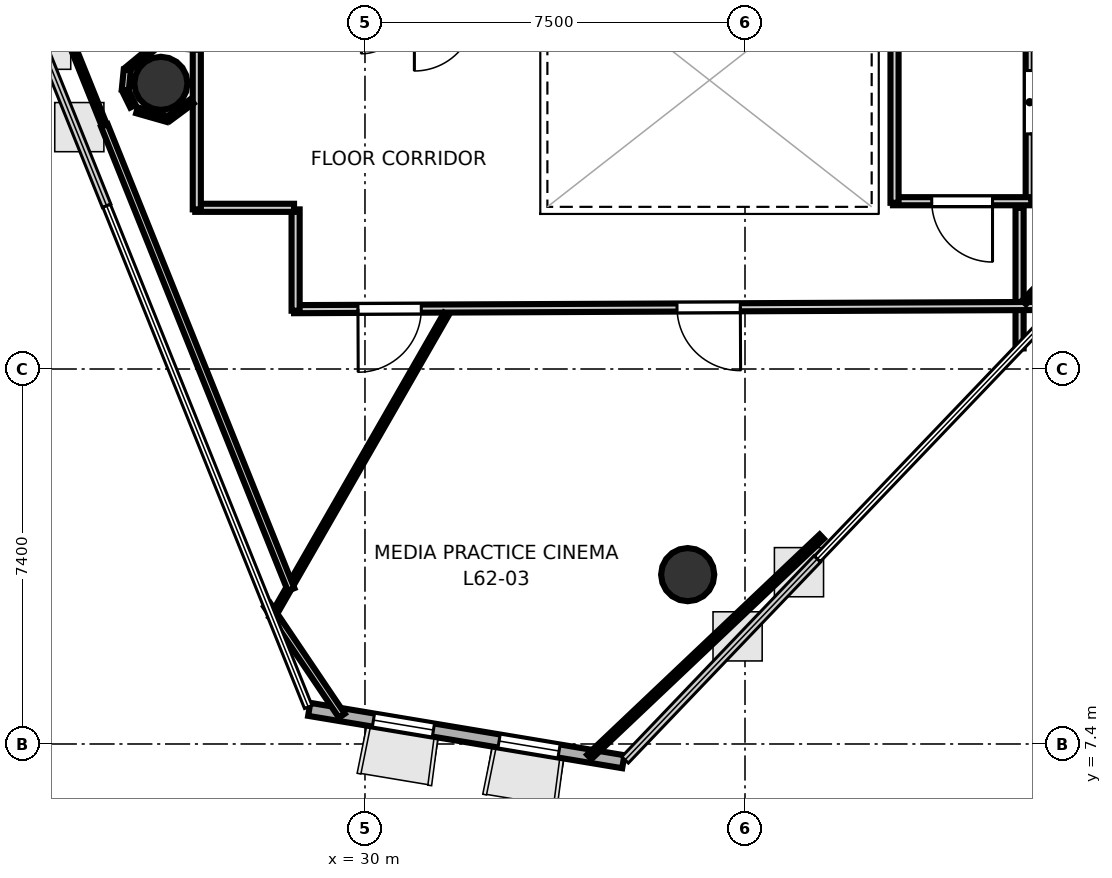
"""IFC4 building model, lengths in metres.
Left out: names, types, materials, properties, quantities, classifications, styles, units other than length and angle.
Written with IfcOpenShell. Run it as: python <this file> out.ifc"""

import sys

from ifc_helpers import new_model, si_unit, direction, frame, frame_2d, origin, origin_2d, place, context, subcontext, project, spatial, rectangle, hollow_circle, extrude, element, fill, save


model = new_model("IFC4")
c1 = context("Model", 3, precision=1e-05, world=origin(), true_north=direction((0.0, 1.0)))
c2 = subcontext(c1, "Body", "Model", "MODEL_VIEW")
j1 = project(units=[si_unit("LENGTHUNIT", "METRE"), si_unit("PLANEANGLEUNIT", "RADIAN")], contexts=[c1])
p1 = place(None, origin())
s1 = spatial("IfcSite", under=j1, at=p1, CompositionType="ELEMENT")
p2 = place(p1, origin())
s2 = spatial("IfcBuilding", under=s1, at=p2, CompositionType="ELEMENT")
p3 = place(p2, frame((0.0, 0.0, 242.7)))
s3 = spatial("IfcBuildingStorey", under=s2, at=p3, CompositionType="ELEMENT", Elevation=242.7)
for number, where, z_axis, x_axis in (
    (1, (25.972, 20.437, 0.0), (0.0, 0.0, 1.0), (1.0, 0.0, 0.0)),
    (2, (36.369, 10.742, 0.0), (0.0, 0.0, 1.0), (1.0, 0.0, 0.0)),
):
    element("IfcColumn", number, at=place(p3, frame(where, z_axis=z_axis, x_axis=x_axis)), inside=s3, PredefinedType="COLUMN", context=c2, shape_type="SweptSolid", body=[
        extrude(hollow_circle(Radius=0.525, WallThickness=0.028, at=origin_2d()), origin(), (0.0, 0.0, 1.0), 3.7),
    ])
p4 = place(p3, frame((28.9, 8.083, 0.0), z_axis=(0.0, 0.0, 1.0), x_axis=(0.986384471993, -0.164455688288, 0.0)))
e3 = element("IfcWall", 3, at=p4, inside=s3, PredefinedType="SOLIDWALL", context=c2, shape_type="SweptSolid", body=[
    extrude(rectangle(XDim=6.284, YDim=0.26, at=frame_2d((3.142, 0.0))), origin(), (0.0, 0.0, 1.0), 3.52),
])
p5 = place(p4, frame((1.285, 0.0, 0.9)))
e4 = element("IfcOpeningElement", 4, at=p5, cuts=e3, PredefinedType="OPENING", context=c2, shape_type="SweptSolid", body=[
    extrude(rectangle(XDim=1.2, YDim=2.0, at=frame_2d((0.6, 1.0))), frame((0.0, 0.14, 0.0), z_axis=(0.0, -1.0, 0.0), x_axis=(1.0, 0.0, 0.0)), (0.0, 0.0, 1.0), 0.28),
])
p6 = place(p4, frame((3.799, 0.0, 0.9)))
e5 = element("IfcOpeningElement", 5, at=p6, cuts=e3, PredefinedType="OPENING", context=c2, shape_type="SweptSolid", body=[
    extrude(rectangle(XDim=1.2, YDim=2.0, at=frame_2d((0.6, 1.0))), frame((0.0, 0.14, 0.0), z_axis=(0.0, -1.0, 0.0), x_axis=(1.0, 0.0, 0.0)), (0.0, 0.0, 1.0), 0.28),
])
p7 = place(p3, frame((43.119, 22.05, 0.0), z_axis=(0.0, 0.0, 1.0), x_axis=(0.0, -1.0, 0.0)))
e6 = element("IfcWall", 6, at=p7, inside=s3, PredefinedType="PARTITIONING", context=c2, shape_type="SweptSolid", body=[
    extrude(rectangle(XDim=3.97, YDim=0.16, at=frame_2d((1.985, 0.0))), origin(), (0.0, 0.0, 1.0), 2.84),
])
p8 = place(p7, frame((1.36, 0.0, 0.0)))
e7 = element("IfcOpeningElement", 7, at=p8, cuts=e6, PredefinedType="OPENING", context=c2, shape_type="SweptSolid", body=[
    extrude(rectangle(XDim=1.25, YDim=2.2, at=frame_2d((0.625, 1.1))), frame((0.0, 0.09, 0.0), z_axis=(0.0, -1.0, 0.0), x_axis=(1.0, 0.0, 0.0)), (0.0, 0.0, 1.0), 0.18),
])
p9 = place(p3, frame((43.15, 18.111, 0.0), z_axis=(0.0, 0.0, 1.0), x_axis=(-1.0, 0.0, 0.0)))
e8 = element("IfcWall", 8, at=p9, inside=s3, PredefinedType="PARTITIONING", context=c2, shape_type="SweptSolid", body=[
    extrude(rectangle(XDim=2.73, YDim=0.16, at=frame_2d((1.365, 0.0))), origin(), (0.0, 0.0, 1.0), 2.84),
])
p10 = place(p9, frame((0.765, 0.0, 0.0)))
e9 = element("IfcOpeningElement", 9, at=p10, cuts=e8, PredefinedType="OPENING", context=c2, shape_type="SweptSolid", body=[
    extrude(rectangle(XDim=1.2, YDim=2.15, at=frame_2d((0.6, 1.075))), frame((0.0, 0.09, 0.0), z_axis=(0.0, -1.0, 0.0), x_axis=(1.0, 0.0, 0.0)), (0.0, 0.0, 1.0), 0.18),
])
p11 = place(p3, frame((40.451, 18.08, 0.0), z_axis=(0.0, 0.0, 1.0), x_axis=(0.0, 1.0, 0.0)))
e10 = element("IfcWall", 10, at=p11, inside=s3, PredefinedType="PARTITIONING", context=c2, shape_type="SweptSolid", body=[
    extrude(rectangle(XDim=3.32, YDim=0.16, at=frame_2d((1.66, 0.0))), origin(), (0.0, 0.0, 1.0), 2.84),
])
p12 = place(p3, frame((42.919, 17.98, 0.0), z_axis=(0.0, 0.0, 1.0), x_axis=(0.0, -1.0, 0.0)))
e11 = element("IfcWall", 11, at=p12, inside=s3, PredefinedType="PARTITIONING", context=c2, shape_type="SweptSolid", body=[
    extrude(rectangle(XDim=2.774, YDim=0.16, at=frame_2d((1.387, 0.0))), origin(), (0.0, 0.0, 1.0), 2.84),
])
p13 = place(p3, frame((43.722, 16.045, 0.0), z_axis=(0.0, 0.0, 1.0), x_axis=(-0.999990917582, -0.004262012887, 0.0)))
e12 = element("IfcWall", 12, at=p13, inside=s3, PredefinedType="PARTITIONING", context=c2, shape_type="SweptSolid", body=[
    extrude(rectangle(XDim=15.123, YDim=0.16, at=frame_2d((7.562, 0.0))), origin(), (0.0, 0.0, 1.0), 2.84),
])
p14 = place(p13, frame((12.611, 0.0, 0.0)))
e13 = element("IfcOpeningElement", 13, at=p14, cuts=e12, PredefinedType="OPENING", context=c2, shape_type="SweptSolid", body=[
    extrude(rectangle(XDim=1.25, YDim=2.2, at=frame_2d((0.625, 1.1))), frame((0.0, 0.09, 0.0), z_axis=(0.0, -1.0, 0.0), x_axis=(1.0, 0.0, 0.0)), (0.0, 0.0, 1.0), 0.18),
])
p15 = place(p13, frame((6.314, 0.0, 0.0)))
e14 = element("IfcOpeningElement", 14, at=p15, cuts=e12, PredefinedType="OPENING", context=c2, shape_type="SweptSolid", body=[
    extrude(rectangle(XDim=1.25, YDim=2.2, at=frame_2d((0.625, 1.1))), frame((0.0, 0.09, 0.0), z_axis=(0.0, -1.0, 0.0), x_axis=(1.0, 0.0, 0.0)), (0.0, 0.0, 1.0), 0.18),
])
p16 = place(p3, frame((28.631, 15.95, 0.0), z_axis=(0.0, 0.0, 1.0), x_axis=(0.0, 1.0, 0.0)))
e15 = element("IfcWall", 15, at=p16, inside=s3, PredefinedType="PARTITIONING", context=c2, shape_type="SweptSolid", body=[
    extrude(rectangle(XDim=2.0, YDim=0.16, at=frame_2d((1.0, 0.0))), origin(), (0.0, 0.0, 1.0), 2.84),
])
p17 = place(p3, frame((28.6, 17.981, 0.0), z_axis=(0.0, 0.0, 1.0), x_axis=(-1.0, 0.0, 0.0)))
e16 = element("IfcWall", 16, at=p17, inside=s3, PredefinedType="PARTITIONING", context=c2, shape_type="SweptSolid", body=[
    extrude(rectangle(XDim=1.95, YDim=0.16, at=frame_2d((0.975, 0.0))), origin(), (0.0, 0.0, 1.0), 2.84),
])
p18 = place(p3, frame((26.681, 17.95, 0.0), z_axis=(0.0, 0.0, 1.0), x_axis=(0.0, 1.0, 0.0)))
e17 = element("IfcWall", 17, at=p18, inside=s3, PredefinedType="PARTITIONING", context=c2, shape_type="SweptSolid", body=[
    extrude(rectangle(XDim=3.2, YDim=0.16, at=frame_2d((1.6, 0.0))), origin(), (0.0, 0.0, 1.0), 2.84),
])
p19 = place(p3, frame((25.814, 21.132, 0.0), z_axis=(0.0, 0.0, 1.0), x_axis=(-0.771205244548, -0.636586577601, 0.0)))
e18 = element("IfcWall", 18, at=p19, inside=s3, PredefinedType="PARTITIONING", context=c2, shape_type="SweptSolid", body=[
    extrude(rectangle(XDim=0.642, YDim=0.105, at=frame_2d((0.321, 0.0))), origin(), (0.0, 0.0, 1.0), 2.84),
])
p20 = place(p3, frame((25.308, 20.702, 0.0), z_axis=(0.0, 0.0, 1.0), x_axis=(-0.098227170207, -0.995164018156, 0.0)))
e19 = element("IfcWall", 19, at=p20, inside=s3, PredefinedType="PARTITIONING", context=c2, shape_type="SweptSolid", body=[
    extrude(rectangle(XDim=0.398, YDim=0.14, at=frame_2d((0.199, 0.0))), origin(), (0.0, 0.0, 1.0), 2.84),
])
p21 = place(p3, frame((25.272, 20.29, 0.0), z_axis=(0.0, 0.0, 1.0), x_axis=(0.441158146801, -0.897429378565, 0.0)))
e20 = element("IfcWall", 20, at=p21, inside=s3, PredefinedType="PARTITIONING", context=c2, shape_type="SweptSolid", body=[
    extrude(rectangle(XDim=0.339, YDim=0.12, at=frame_2d((0.17, 0.0))), origin(), (0.0, 0.0, 1.0), 2.84),
])
p22 = place(p3, frame((24.826, 19.683, 0.0), z_axis=(0.0, 0.0, 1.0), x_axis=(-0.37331171628, 0.92770596769, 0.0)))
e21 = element("IfcWall", 21, at=p22, inside=s3, PredefinedType="PARTITIONING", context=c2, shape_type="SweptSolid", body=[
    extrude(rectangle(XDim=10.885, YDim=0.105, at=frame_2d((5.443, 0.0))), origin(), (0.0, 0.0, 1.0), 2.84),
])
p23 = place(p3, frame((31.607, 15.885, 0.0), z_axis=(0.0, 0.0, 1.0), x_axis=(-0.498055632323, -0.867145078468, 0.0)))
e22 = element("IfcWall", 22, at=p23, inside=s3, PredefinedType="PARTITIONING", context=c2, shape_type="SweptSolid", body=[
    extrude(rectangle(XDim=6.923, YDim=0.105, at=frame_2d((3.461, 0.0))), origin(), (0.0, 0.0, 1.0), 2.84),
])
p24 = place(p3, frame((28.542, 10.448, 0.0), z_axis=(0.0, 0.0, 1.0), x_axis=(-0.373309021007, 0.927707052272, 0.0)))
e23 = element("IfcWall", 23, at=p24, inside=s3, PredefinedType="PARTITIONING", context=c2, shape_type="SweptSolid", body=[
    extrude(rectangle(XDim=9.87, YDim=0.14, at=frame_2d((4.935, 0.0))), origin(), (0.0, 0.0, 1.0), 2.84),
])
p25 = place(p3, frame((25.501, 19.905, 0.0), z_axis=(0.0, 0.0, 1.0), x_axis=(0.961835324747, -0.273628960581, 0.0)))
e24 = element("IfcWall", 24, at=p25, inside=s3, PredefinedType="PARTITIONING", context=c2, shape_type="SweptSolid", body=[
    extrude(rectangle(XDim=0.62, YDim=0.12, at=frame_2d((0.31, 0.0))), origin(), (0.0, 0.0, 1.0), 2.84),
])
p26 = place(p3, frame((26.124, 19.74, 0.0), z_axis=(0.0, 0.0, 1.0), x_axis=(0.802928569277, 0.596075257529, 0.0)))
e25 = element("IfcWall", 25, at=p26, inside=s3, PredefinedType="PARTITIONING", context=c2, shape_type="SweptSolid", body=[
    extrude(rectangle(XDim=0.578, YDim=0.105, at=frame_2d((0.289, 0.0))), origin(), (0.0, 0.0, 1.0), 2.84),
])
p27 = place(p3, frame((39.015, 11.492, 0.0), z_axis=(0.0, 0.0, 1.0), x_axis=(-0.725951668787, -0.687745719424, 0.0)))
e26 = element("IfcWall", 26, at=p27, inside=s3, PredefinedType="PARTITIONING", context=c2, shape_type="SweptSolid", body=[
    extrude(rectangle(XDim=6.32, YDim=0.12, at=frame_2d((3.16, 0.0))), origin(), (0.0, 0.0, 1.0), 2.84),
])
p28 = place(p3, frame((29.544, 7.959, 0.0), z_axis=(0.0, 0.0, 1.0), x_axis=(-0.559054284202, 0.829131055573, 0.0)))
e27 = element("IfcWall", 27, at=p28, inside=s3, PredefinedType="PARTITIONING", context=c2, shape_type="SweptSolid", body=[
    extrude(rectangle(XDim=2.635, YDim=0.14, at=frame_2d((1.317, 0.0))), origin(), (0.0, 0.0, 1.0), 2.84),
])
p29 = place(p3, frame((47.298, 20.601, 0.0), z_axis=(0.0, 0.0, 1.0), x_axis=(-0.691236936223, -0.722628187937, 0.0)))
e28 = element("IfcWall", 28, at=p29, inside=s3, PredefinedType="PARTITIONING", context=c2, shape_type="SweptSolid", body=[
    extrude(rectangle(XDim=6.206, YDim=0.105, at=frame_2d((3.103, 0.0))), origin(), (0.0, 0.0, 1.0), 2.84),
])
p30 = place(p10, origin())
e29 = element("IfcDoor", 29, at=p30, inside=s3, OperationType="SINGLE_SWING_LEFT", PredefinedType="DOOR", context=c2, shape_type="SweptSolid", body=[
    extrude(rectangle(XDim=1.2, YDim=2.15, at=frame_2d((0.6, 1.075))), frame((0.0, 0.025, 0.0), z_axis=(0.0, -1.0, 0.0), x_axis=(1.0, 0.0, 0.0)), (0.0, 0.0, 1.0), 0.05),
])
fill(e9, e29)
p31 = place(p14, origin())
e30 = element("IfcDoor", 30, at=p31, inside=s3, OperationType="SINGLE_SWING_RIGHT", PredefinedType="DOOR", context=c2, shape_type="SweptSolid", body=[
    extrude(rectangle(XDim=1.25, YDim=2.2, at=frame_2d((0.625, 1.1))), frame((0.0, 0.025, 0.0), z_axis=(0.0, -1.0, 0.0), x_axis=(1.0, 0.0, 0.0)), (0.0, 0.0, 1.0), 0.05),
])
fill(e13, e30)
p32 = place(p15, origin())
e31 = element("IfcDoor", 31, at=p32, inside=s3, OperationType="SINGLE_SWING_LEFT", PredefinedType="DOOR", context=c2, shape_type="SweptSolid", body=[
    extrude(rectangle(XDim=1.25, YDim=2.2, at=frame_2d((0.625, 1.1))), frame((0.0, 0.025, 0.0), z_axis=(0.0, -1.0, 0.0), x_axis=(1.0, 0.0, 0.0)), (0.0, 0.0, 1.0), 0.05),
])
fill(e14, e31)
p33 = place(p8, origin())
e32 = element("IfcDoor", 32, at=p33, inside=s3, OperationType="SINGLE_SWING_RIGHT", PredefinedType="DOOR", context=c2, shape_type="SweptSolid", body=[
    extrude(rectangle(XDim=1.25, YDim=2.2, at=frame_2d((0.625, 1.1))), frame((0.0, 0.025, 0.0), z_axis=(0.0, -1.0, 0.0), x_axis=(1.0, 0.0, 0.0)), (0.0, 0.0, 1.0), 0.05),
])
fill(e7, e32)
p34 = place(p5, origin())
e33 = element("IfcWindow", 33, at=p34, inside=s3, PartitioningType="SINGLE_PANEL", PredefinedType="WINDOW", context=c2, shape_type="SweptSolid", body=[
    extrude(rectangle(XDim=1.2, YDim=2.0, at=frame_2d((0.6, 1.0))), frame((0.0, 0.03, 0.0), z_axis=(0.0, -1.0, 0.0), x_axis=(1.0, 0.0, 0.0)), (0.0, 0.0, 1.0), 0.06),
])
fill(e4, e33)
p35 = place(p6, origin())
e34 = element("IfcWindow", 34, at=p35, inside=s3, PartitioningType="SINGLE_PANEL", PredefinedType="WINDOW", context=c2, shape_type="SweptSolid", body=[
    extrude(rectangle(XDim=1.2, YDim=2.0, at=frame_2d((0.6, 1.0))), frame((0.0, 0.03, 0.0), z_axis=(0.0, -1.0, 0.0), x_axis=(1.0, 0.0, 0.0)), (0.0, 0.0, 1.0), 0.06),
])
fill(e5, e34)
save(model, sys.argv[1])
